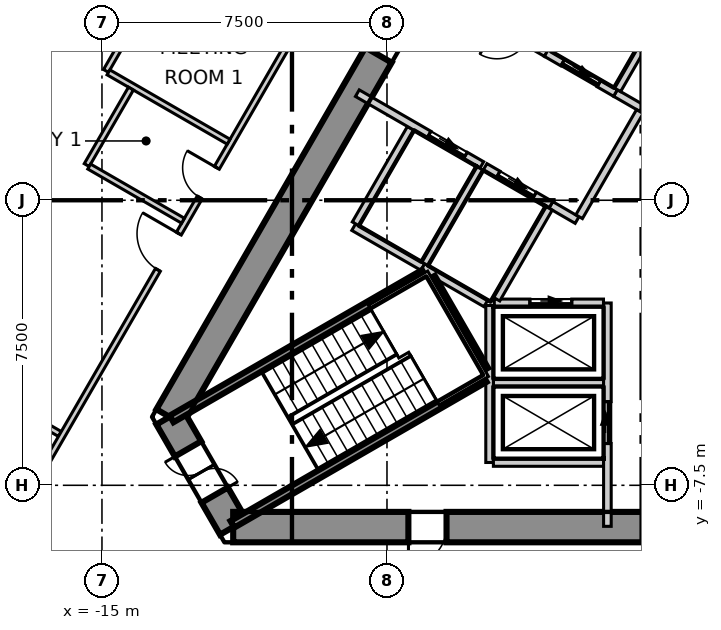
"""IFC4 building model, lengths in metres.
Left out: names, types, materials, properties, quantities, classifications, styles, units other than length and angle.
Written with IfcOpenShell. Run it as: python <this file> out.ifc"""

import sys

from ifc_helpers import new_model, si_unit, direction, frame, frame_2d, origin, place, context, subcontext, project, spatial, polyline, rectangle, outline, extrude, element, fill, save


model = new_model("IFC4")
c1 = context("Model", 3, precision=1e-05, world=origin(), true_north=direction((0.0, 1.0)))
c2 = subcontext(c1, "Body", "Model", "MODEL_VIEW")
j1 = project(units=[si_unit("LENGTHUNIT", "METRE"), si_unit("PLANEANGLEUNIT", "RADIAN")], contexts=[c1])
p1 = place(None, origin())
s1 = spatial("IfcSite", under=j1, at=p1, CompositionType="ELEMENT")
p2 = place(p1, origin())
s2 = spatial("IfcBuilding", under=s1, at=p2, CompositionType="ELEMENT")
p3 = place(p2, frame((0.0, 0.0, 140.3)))
s3 = spatial("IfcBuildingStorey", under=s2, at=p3, CompositionType="ELEMENT", Elevation=140.3)
p4 = place(p3, frame((-1.674, 14.3, -0.3), z_axis=(0.0, 0.0, 1.0), x_axis=(-0.499995765644, -0.866027848477, 0.0)))
e1 = element("IfcWall", 1, at=p4, inside=s3, PredefinedType="SHEAR", context=c2, shape_type="SweptSolid", body=[
    extrude(outline(polyline([(-0.231, -0.4), (1.732, -0.4), (3.695, -0.4), (5.658, -0.4), (7.621, -0.4), (9.584, -0.4), (11.547, -0.4), (13.51, -0.4), (15.473, -0.4), (17.436, -0.4), (19.399, -0.4), (21.362, -0.4), (23.325, -0.4), (22.863, 0.4), (20.977, 0.4), (19.091, 0.4), (17.205, 0.4), (15.319, 0.4), (13.433, 0.4), (11.547, 0.4), (9.661, 0.4), (7.775, 0.4), (5.889, 0.4), (4.003, 0.4), (2.117, 0.4), (0.231, 0.4), (-0.231, -0.4)])), origin(), (0.0, 0.0, 1.0), 4.0),
])
p5 = place(p4, frame((10.997, 0.0, 0.3)))
e2 = element("IfcOpeningElement", 2, at=p5, cuts=e1, PredefinedType="OPENING", context=c2, shape_type="SweptSolid", body=[
    extrude(rectangle(XDim=1.1, YDim=2.1, at=frame_2d((0.55, 1.05))), frame((0.0, 0.41, 0.0), z_axis=(0.0, -1.0, 0.0), x_axis=(1.0, 0.0, 0.0)), (0.0, 0.0, 1.0), 0.82),
])
p6 = place(p4, frame((4.474, 0.0, 0.3)))
e3 = element("IfcOpeningElement", 3, at=p6, cuts=e1, PredefinedType="OPENING", context=c2, shape_type="SweptSolid", body=[
    extrude(rectangle(XDim=0.9, YDim=2.1, at=frame_2d((0.45, 1.05))), frame((0.0, 0.41, 0.0), z_axis=(0.0, -1.0, 0.0), x_axis=(1.0, 0.0, 0.0)), (0.0, 0.0, 1.0), 0.82),
])
p7 = place(p3, frame((-13.221, -5.7, -0.3), z_axis=(0.0, 0.0, 1.0), x_axis=(0.49987182685, -0.866099391942, 0.0)))
e4 = element("IfcWall", 4, at=p7, inside=s3, PredefinedType="SHEAR", context=c2, shape_type="SweptSolid", body=[
    extrude(outline(polyline([(-0.231, -0.4), (1.674, -0.4), (3.579, -0.4), (3.118, 0.4), (1.674, 0.4), (0.231, 0.4), (-0.231, -0.4)])), origin(), (0.0, 0.0, 1.0), 4.0),
])
p8 = place(p7, frame((0.974, 0.0, 0.3)))
e5 = element("IfcOpeningElement", 5, at=p8, cuts=e4, PredefinedType="OPENING", context=c2, shape_type="SweptSolid", body=[
    extrude(rectangle(XDim=1.4, YDim=2.1, at=frame_2d((0.7, 1.05))), frame((0.0, 0.41, 0.0), z_axis=(0.0, -1.0, 0.0), x_axis=(1.0, 0.0, 0.0)), (0.0, 0.0, 1.0), 0.82),
])
p9 = place(p3, frame((-11.547, -8.6, -0.3), z_axis=(0.0, 0.0, 1.0), x_axis=(1.0, 0.0, 0.0)))
e6 = element("IfcWall", 6, at=p9, inside=s3, PredefinedType="SHEAR", context=c2, shape_type="SweptSolid", body=[
    extrude(outline(polyline([(-0.231, -0.4), (1.732, -0.4), (3.695, -0.4), (5.658, -0.4), (7.621, -0.4), (9.584, -0.4), (11.547, -0.4), (13.51, -0.4), (15.473, -0.4), (17.436, -0.4), (19.399, -0.4), (21.362, -0.4), (23.325, -0.4), (22.863, 0.4), (20.977, 0.4), (19.091, 0.4), (17.205, 0.4), (15.319, 0.4), (13.433, 0.4), (11.547, 0.4), (9.661, 0.4), (7.775, 0.4), (5.889, 0.4), (4.003, 0.4), (2.117, 0.4), (0.231, 0.4), (-0.231, -0.4)])), origin(), (0.0, 0.0, 1.0), 4.0),
])
p10 = place(p9, frame((4.612, 0.0, 0.3)))
e7 = element("IfcOpeningElement", 7, at=p10, cuts=e6, PredefinedType="OPENING", context=c2, shape_type="SweptSolid", body=[
    extrude(rectangle(XDim=1.0, YDim=2.1, at=frame_2d((0.5, 1.05))), frame((0.0, 0.41, 0.0), z_axis=(0.0, -1.0, 0.0), x_axis=(1.0, 0.0, 0.0)), (0.0, 0.0, 1.0), 0.82),
])
p11 = place(p9, frame((17.722, 0.0, 0.3)))
e8 = element("IfcOpeningElement", 8, at=p11, cuts=e6, PredefinedType="OPENING", context=c2, shape_type="SweptSolid", body=[
    extrude(rectangle(XDim=0.9, YDim=2.1, at=frame_2d((0.45, 1.05))), frame((0.0, 0.41, 0.0), z_axis=(0.0, -1.0, 0.0), x_axis=(1.0, 0.0, 0.0)), (0.0, 0.0, 1.0), 0.82),
])
p12 = place(p3, frame((-3.063, 34.172, 0.0), z_axis=(0.0, 0.0, 1.0), x_axis=(-0.500008098571, -0.866020728022, 0.0)))
e9 = element("IfcWall", 9, at=p12, inside=s3, PredefinedType="ELEMENTEDWALL", context=c2, shape_type="SweptSolid", body=[
    extrude(rectangle(XDim=56.105, YDim=0.2, at=frame_2d((28.052, 0.0))), origin(), (0.0, 0.0, 1.0), 3.7),
])
p13 = place(p12, frame((2.197, 0.0, 0.9)))
e10 = element("IfcOpeningElement", 10, at=p13, cuts=e9, PredefinedType="OPENING", context=c2, shape_type="SweptSolid", body=[
    extrude(rectangle(XDim=4.9, YDim=2.5, at=frame_2d((2.45, 1.25))), frame((0.0, 0.11, 0.0), z_axis=(0.0, -1.0, 0.0), x_axis=(1.0, 0.0, 0.0)), (0.0, 0.0, 1.0), 0.22),
])
p14 = place(p12, frame((8.887, 0.0, 0.9)))
e11 = element("IfcOpeningElement", 11, at=p14, cuts=e9, PredefinedType="OPENING", context=c2, shape_type="SweptSolid", body=[
    extrude(rectangle(XDim=4.9, YDim=2.5, at=frame_2d((2.45, 1.25))), frame((0.0, 0.11, 0.0), z_axis=(0.0, -1.0, 0.0), x_axis=(1.0, 0.0, 0.0)), (0.0, 0.0, 1.0), 0.22),
])
p15 = place(p12, frame((15.577, 0.0, 0.9)))
e12 = element("IfcOpeningElement", 12, at=p15, cuts=e9, PredefinedType="OPENING", context=c2, shape_type="SweptSolid", body=[
    extrude(rectangle(XDim=4.9, YDim=2.5, at=frame_2d((2.45, 1.25))), frame((0.0, 0.11, 0.0), z_axis=(0.0, -1.0, 0.0), x_axis=(1.0, 0.0, 0.0)), (0.0, 0.0, 1.0), 0.22),
])
p16 = place(p12, frame((22.267, 0.0, 0.9)))
e13 = element("IfcOpeningElement", 13, at=p16, cuts=e9, PredefinedType="OPENING", context=c2, shape_type="SweptSolid", body=[
    extrude(rectangle(XDim=4.9, YDim=2.5, at=frame_2d((2.45, 1.25))), frame((0.0, 0.11, 0.0), z_axis=(0.0, -1.0, 0.0), x_axis=(1.0, 0.0, 0.0)), (0.0, 0.0, 1.0), 0.22),
])
p17 = place(p12, frame((28.957, 0.0, 0.9)))
e14 = element("IfcOpeningElement", 14, at=p17, cuts=e9, PredefinedType="OPENING", context=c2, shape_type="SweptSolid", body=[
    extrude(rectangle(XDim=4.9, YDim=2.5, at=frame_2d((2.45, 1.25))), frame((0.0, 0.11, 0.0), z_axis=(0.0, -1.0, 0.0), x_axis=(1.0, 0.0, 0.0)), (0.0, 0.0, 1.0), 0.22),
])
p18 = place(p12, frame((35.647, 0.0, 0.9)))
e15 = element("IfcOpeningElement", 15, at=p18, cuts=e9, PredefinedType="OPENING", context=c2, shape_type="SweptSolid", body=[
    extrude(rectangle(XDim=4.9, YDim=2.5, at=frame_2d((2.45, 1.25))), frame((0.0, 0.11, 0.0), z_axis=(0.0, -1.0, 0.0), x_axis=(1.0, 0.0, 0.0)), (0.0, 0.0, 1.0), 0.22),
])
p19 = place(p12, frame((42.337, 0.0, 0.9)))
e16 = element("IfcOpeningElement", 16, at=p19, cuts=e9, PredefinedType="OPENING", context=c2, shape_type="SweptSolid", body=[
    extrude(rectangle(XDim=4.9, YDim=2.5, at=frame_2d((2.45, 1.25))), frame((0.0, 0.11, 0.0), z_axis=(0.0, -1.0, 0.0), x_axis=(1.0, 0.0, 0.0)), (0.0, 0.0, 1.0), 0.22),
])
p20 = place(p12, frame((49.027, 0.0, 0.9)))
e17 = element("IfcOpeningElement", 17, at=p20, cuts=e9, PredefinedType="OPENING", context=c2, shape_type="SweptSolid", body=[
    extrude(rectangle(XDim=4.9, YDim=2.5, at=frame_2d((2.45, 1.25))), frame((0.0, 0.11, 0.0), z_axis=(0.0, -1.0, 0.0), x_axis=(1.0, 0.0, 0.0)), (0.0, 0.0, 1.0), 0.22),
])
p21 = place(p3, frame((-23.715, -1.758, 0.0), z_axis=(0.0, 0.0, 1.0), x_axis=(0.866033311227, -0.499986303657, 0.0)))
e18 = element("IfcWall", 18, at=p21, inside=s3, PredefinedType="PARTITIONING", context=c2, shape_type="SweptSolid", body=[
    extrude(rectangle(XDim=8.784, YDim=0.15, at=frame_2d((4.392, 0.0))), origin(), (0.0, 0.0, 1.0), 3.7),
])
p22 = place(p3, frame((-18.631, -10.669, 0.0), z_axis=(0.0, 0.0, 1.0), x_axis=(0.50004165882, 0.866001350717, 0.0)))
e19 = element("IfcWall", 19, at=p22, inside=s3, PredefinedType="PARTITIONING", context=c2, shape_type="SweptSolid", body=[
    extrude(rectangle(XDim=17.655, YDim=0.15, at=frame_2d((8.827, 0.0))), origin(), (0.0, 0.0, 1.0), 3.7),
])
p23 = place(p22, frame((10.206, 0.0, 0.0)))
e20 = element("IfcOpeningElement", 20, at=p23, cuts=e19, PredefinedType="OPENING", context=c2, shape_type="SweptSolid", body=[
    extrude(rectangle(XDim=1.1, YDim=2.1, at=frame_2d((0.55, 1.05))), frame((0.0, 0.085, 0.0), z_axis=(0.0, -1.0, 0.0), x_axis=(1.0, 0.0, 0.0)), (0.0, 0.0, 1.0), 0.17),
])
p24 = place(p22, frame((12.406, 0.0, 0.0)))
e21 = element("IfcOpeningElement", 21, at=p24, cuts=e19, PredefinedType="OPENING", context=c2, shape_type="SweptSolid", body=[
    extrude(rectangle(XDim=0.9, YDim=2.1, at=frame_2d((0.45, 1.05))), frame((0.0, 0.085, 0.0), z_axis=(0.0, -1.0, 0.0), x_axis=(1.0, 0.0, 0.0)), (0.0, 0.0, 1.0), 0.17),
])
p25 = place(p22, frame((1.925, 0.0, 0.0)))
e22 = element("IfcOpeningElement", 22, at=p25, cuts=e19, PredefinedType="OPENING", context=c2, shape_type="SweptSolid", body=[
    extrude(rectangle(XDim=1.1, YDim=2.1, at=frame_2d((0.55, 1.05))), frame((0.0, 0.085, 0.0), z_axis=(0.0, -1.0, 0.0), x_axis=(1.0, 0.0, 0.0)), (0.0, 0.0, 1.0), 0.17),
])
p26 = place(p3, frame((-14.894, 3.403, 0.0), z_axis=(0.0, 0.0, 1.0), x_axis=(0.500064136673, 0.865988371292, 0.0)))
e23 = element("IfcWall", 23, at=p26, inside=s3, PredefinedType="PARTITIONING", context=c2, shape_type="SweptSolid", body=[
    extrude(rectangle(XDim=3.525, YDim=0.15, at=frame_2d((1.763, 0.0))), origin(), (0.0, 0.0, 1.0), 3.7),
])
p27 = place(p3, frame((-14.829, 3.366, 0.0), z_axis=(0.0, 0.0, 1.0), x_axis=(0.866040790738, -0.499973348067, 0.0)))
e24 = element("IfcWall", 24, at=p27, inside=s3, PredefinedType="PARTITIONING", context=c2, shape_type="SweptSolid", body=[
    extrude(rectangle(XDim=3.65, YDim=0.15, at=frame_2d((1.825, 0.0))), origin(), (0.0, 0.0, 1.0), 3.7),
])
p28 = place(p3, frame((-15.401, 0.925, 0.0), z_axis=(0.0, 0.0, 1.0), x_axis=(0.500216356891, 0.865900454035, 0.0)))
e25 = element("IfcWall", 25, at=p28, inside=s3, PredefinedType="PARTITIONING", context=c2, shape_type="SweptSolid", body=[
    extrude(rectangle(XDim=2.325, YDim=0.15, at=frame_2d((1.162, 0.0))), origin(), (0.0, 0.0, 1.0), 3.7),
])
p29 = place(p3, frame((-15.336, 0.887, 0.0), z_axis=(0.0, 0.0, 1.0), x_axis=(0.866004402611, -0.500036373335, 0.0)))
e26 = element("IfcWall", 26, at=p29, inside=s3, PredefinedType="PARTITIONING", context=c2, shape_type="SweptSolid", body=[
    extrude(rectangle(XDim=2.85, YDim=0.15, at=frame_2d((1.425, 0.0))), origin(), (0.0, 0.0, 1.0), 3.7),
])
p30 = place(p3, frame((-8.376, -0.707, 0.0), z_axis=(0.0, 0.0, 1.0), x_axis=(0.866067520717, -0.499927044236, 0.0)))
e27 = element("IfcWall", 27, at=p30, inside=s3, PredefinedType="SOLIDWALL", context=c2, shape_type="SweptSolid", body=[
    extrude(rectangle(XDim=2.1, YDim=0.2, at=frame_2d((1.05, 0.0))), origin(), (0.0, 0.0, 1.0), 3.7),
])
p31 = place(p3, frame((-8.326, -0.62, 0.0), z_axis=(0.0, 0.0, 1.0), x_axis=(0.500023687443, 0.866011727401, 0.0)))
e28 = element("IfcWall", 28, at=p31, inside=s3, PredefinedType="SOLIDWALL", context=c2, shape_type="SweptSolid", body=[
    extrude(rectangle(XDim=2.9, YDim=0.2, at=frame_2d((1.45, 0.0))), origin(), (0.0, 0.0, 1.0), 3.7),
])
p32 = place(p3, frame((-4.7, -4.8, 0.0), z_axis=(0.0, 0.0, 1.0), x_axis=(1.0, 0.0, 0.0)))
e29 = element("IfcWall", 29, at=p32, inside=s3, PredefinedType="SOLIDWALL", context=c2, shape_type="SweptSolid", body=[
    extrude(rectangle(XDim=2.9, YDim=0.2, at=frame_2d((1.45, 0.0))), origin(), (0.0, 0.0, 1.0), 3.7),
])
p33 = place(p3, frame((-4.8, -6.9, 0.0), z_axis=(0.0, 0.0, 1.0), x_axis=(0.0, 1.0, 0.0)))
e30 = element("IfcWall", 30, at=p33, inside=s3, PredefinedType="SOLIDWALL", context=c2, shape_type="SweptSolid", body=[
    extrude(rectangle(XDim=4.131, YDim=0.2, at=frame_2d((2.065, 0.0))), origin(), (0.0, 0.0, 1.0), 3.7),
])
p34 = place(p3, frame((-4.7, -6.9, 0.0), z_axis=(0.0, 0.0, 1.0), x_axis=(1.0, 0.0, 0.0)))
e31 = element("IfcWall", 31, at=p34, inside=s3, PredefinedType="SOLIDWALL", context=c2, shape_type="SweptSolid", body=[
    extrude(rectangle(XDim=2.9, YDim=0.2, at=frame_2d((1.45, 0.0))), origin(), (0.0, 0.0, 1.0), 3.7),
])
p35 = place(p3, frame((-1.7, -8.58, 0.0), z_axis=(0.0, 0.0, 1.0), x_axis=(0.0, 1.0, 0.0)))
e32 = element("IfcWall", 32, at=p35, inside=s3, PredefinedType="SOLIDWALL", context=c2, shape_type="SweptSolid", body=[
    extrude(rectangle(XDim=5.877, YDim=0.2, at=frame_2d((2.938, 0.0))), origin(), (0.0, 0.0, 1.0), 3.7),
])
p36 = place(p35, frame((2.18, 0.0, 0.0)))
e33 = element("IfcOpeningElement", 33, at=p36, cuts=e32, PredefinedType="OPENING", context=c2, shape_type="SweptSolid", body=[
    extrude(rectangle(XDim=1.1, YDim=2.1, at=frame_2d((0.55, 1.05))), frame((0.0, 0.11, 0.0), z_axis=(0.0, -1.0, 0.0), x_axis=(1.0, 0.0, 0.0)), (0.0, 0.0, 1.0), 0.22),
])
p37 = place(p3, frame((-4.676, -2.7, 0.0), z_axis=(0.0, 0.0, 1.0), x_axis=(1.0, 0.0, 0.0)))
e34 = element("IfcWall", 34, at=p37, inside=s3, PredefinedType="SOLIDWALL", context=c2, shape_type="SweptSolid", body=[
    extrude(rectangle(XDim=2.873, YDim=0.2, at=frame_2d((1.437, 0.0))), origin(), (0.0, 0.0, 1.0), 3.7),
])
p38 = place(p37, frame((0.937, 0.0, 0.0)))
e35 = element("IfcOpeningElement", 35, at=p38, cuts=e34, PredefinedType="OPENING", context=c2, shape_type="SweptSolid", body=[
    extrude(rectangle(XDim=1.1, YDim=2.1, at=frame_2d((0.55, 1.05))), frame((0.0, 0.11, 0.0), z_axis=(0.0, -1.0, 0.0), x_axis=(1.0, 0.0, 0.0)), (0.0, 0.0, 1.0), 0.22),
])
p39 = place(p3, frame((-8.28, 2.818, 0.0), z_axis=(0.0, 0.0, 1.0), x_axis=(0.86600175068, -0.50004096614, 0.0)))
e36 = element("IfcWall", 36, at=p39, inside=s3, PredefinedType="SOLIDWALL", context=c2, shape_type="SweptSolid", body=[
    extrude(rectangle(XDim=3.782, YDim=0.2, at=frame_2d((1.891, 0.0))), origin(), (0.0, 0.0, 1.0), 3.7),
])
p40 = place(p39, frame((2.18, 0.0, 0.0)))
e37 = element("IfcOpeningElement", 37, at=p40, cuts=e36, PredefinedType="OPENING", context=c2, shape_type="SweptSolid", body=[
    extrude(rectangle(XDim=1.1, YDim=2.1, at=frame_2d((0.55, 1.05))), frame((0.0, 0.11, 0.0), z_axis=(0.0, -1.0, 0.0), x_axis=(1.0, 0.0, 0.0)), (0.0, 0.0, 1.0), 0.22),
])
p41 = place(p3, frame((-3.188, -0.122, 0.0), z_axis=(0.0, 0.0, 1.0), x_axis=(0.865705793592, -0.50055317294, 0.0)))
e38 = element("IfcWall", 38, at=p41, inside=s3, PredefinedType="SOLIDWALL", context=c2, shape_type="SweptSolid", body=[
    extrude(rectangle(XDim=0.797, YDim=0.2, at=frame_2d((0.398, 0.0))), origin(), (0.0, 0.0, 1.0), 3.7),
])
p42 = place(p3, frame((-6.58, 5.762, 0.0), z_axis=(0.0, 0.0, 1.0), x_axis=(0.866029704776, -0.49999255039, 0.0)))
e39 = element("IfcWall", 39, at=p42, inside=s3, PredefinedType="SOLIDWALL", context=c2, shape_type="SweptSolid", body=[
    extrude(rectangle(XDim=3.782, YDim=0.2, at=frame_2d((1.891, 0.0))), origin(), (0.0, 0.0, 1.0), 3.7),
])
p43 = place(p42, frame((2.279, 0.0, 0.0)))
e40 = element("IfcOpeningElement", 40, at=p43, cuts=e39, PredefinedType="OPENING", context=c2, shape_type="SweptSolid", body=[
    extrude(rectangle(XDim=0.9, YDim=2.1, at=frame_2d((0.45, 1.05))), frame((0.0, 0.11, 0.0), z_axis=(0.0, -1.0, 0.0), x_axis=(1.0, 0.0, 0.0)), (0.0, 0.0, 1.0), 0.22),
])
p44 = place(p3, frame((-1.488, 2.822, 0.0), z_axis=(0.0, 0.0, 1.0), x_axis=(0.866236612152, -0.499633997809, 0.0)))
e41 = element("IfcWall", 41, at=p44, inside=s3, PredefinedType="SOLIDWALL", context=c2, shape_type="SweptSolid", body=[
    extrude(rectangle(XDim=0.796, YDim=0.2, at=frame_2d((0.398, 0.0))), origin(), (0.0, 0.0, 1.0), 3.7),
])
p45 = place(p3, frame((-2.444, -0.433, 0.0), z_axis=(0.0, 0.0, 1.0), x_axis=(0.500035624827, 0.866004834804, 0.0)))
e42 = element("IfcWall", 42, at=p45, inside=s3, PredefinedType="SOLIDWALL", context=c2, shape_type="SweptSolid", body=[
    extrude(rectangle(XDim=3.194, YDim=0.2, at=frame_2d((1.597, 0.0))), origin(), (0.0, 0.0, 1.0), 3.7),
])
p46 = place(p3, frame((-6.557, -1.757, 0.0), z_axis=(0.0, 0.0, 1.0), x_axis=(0.8659754619, -0.500086491905, 0.0)))
e43 = element("IfcWall", 43, at=p46, inside=s3, PredefinedType="SOLIDWALL", context=c2, shape_type="SweptSolid", body=[
    extrude(rectangle(XDim=1.916, YDim=0.2, at=frame_2d((0.958, 0.0))), origin(), (0.0, 0.0, 1.0), 3.7),
])
p47 = place(p3, frame((-6.507, -1.67, 0.0), z_axis=(0.0, 0.0, 1.0), x_axis=(0.50012328804, 0.865954211699, 0.0)))
e44 = element("IfcWall", 44, at=p47, inside=s3, PredefinedType="SOLIDWALL", context=c2, shape_type="SweptSolid", body=[
    extrude(rectangle(XDim=2.9, YDim=0.2, at=frame_2d((1.45, 0.0))), origin(), (0.0, 0.0, 1.0), 3.7),
])
p48 = place(p3, frame((-4.92, 0.878, 0.0), z_axis=(0.0, 0.0, 1.0), x_axis=(0.866010750942, -0.50002537861, 0.0)))
e45 = element("IfcWall", 45, at=p48, inside=s3, PredefinedType="SOLIDWALL", context=c2, shape_type="SweptSolid", body=[
    extrude(rectangle(XDim=2.0, YDim=0.2, at=frame_2d((1.0, 0.0))), origin(), (0.0, 0.0, 1.0), 3.7),
])
p49 = place(p48, frame((0.4, 0.0, 0.0)))
e46 = element("IfcOpeningElement", 46, at=p49, cuts=e45, PredefinedType="OPENING", context=c2, shape_type="SweptSolid", body=[
    extrude(rectangle(XDim=1.1, YDim=2.1, at=frame_2d((0.55, 1.05))), frame((0.0, 0.11, 0.0), z_axis=(0.0, -1.0, 0.0), x_axis=(1.0, 0.0, 0.0)), (0.0, 0.0, 1.0), 0.22),
])
p50 = place(p3, frame((-4.619, -2.6, 0.0), z_axis=(0.0, 0.0, 1.0), x_axis=(0.50009492287, 0.865970593103, 0.0)))
e47 = element("IfcWall", 47, at=p50, inside=s3, PredefinedType="SOLIDWALL", context=c2, shape_type="SweptSolid", body=[
    extrude(rectangle(XDim=2.761, YDim=0.2, at=frame_2d((1.381, 0.0))), origin(), (0.0, 0.0, 1.0), 3.7),
])
p51 = place(p3, frame((-3.309, 3.873, 0.0), z_axis=(0.0, 0.0, 1.0), x_axis=(0.866098583652, -0.499873227325, 0.0)))
e48 = element("IfcWall", 48, at=p51, inside=s3, PredefinedType="SOLIDWALL", context=c2, shape_type="SweptSolid", body=[
    extrude(rectangle(XDim=2.103, YDim=0.2, at=frame_2d((1.051, 0.0))), origin(), (0.0, 0.0, 1.0), 3.7),
])
p52 = place(p51, frame((0.502, 0.0, 0.0)))
e49 = element("IfcOpeningElement", 49, at=p52, cuts=e48, PredefinedType="OPENING", context=c2, shape_type="SweptSolid", body=[
    extrude(rectangle(XDim=1.1, YDim=2.1, at=frame_2d((0.55, 1.05))), frame((0.0, 0.11, 0.0), z_axis=(0.0, -1.0, 0.0), x_axis=(1.0, 0.0, 0.0)), (0.0, 0.0, 1.0), 0.22),
])
p53 = place(p3, frame((-1.438, 2.909, 0.0), z_axis=(0.0, 0.0, 1.0), x_axis=(0.499829630636, 0.866123744241, 0.0)))
e50 = element("IfcWall", 50, at=p53, inside=s3, PredefinedType="SOLIDWALL", context=c2, shape_type="SweptSolid", body=[
    extrude(rectangle(XDim=2.761, YDim=0.2, at=frame_2d((1.38, 0.0))), origin(), (0.0, 0.0, 1.0), 3.7),
])
p54 = place(p3, frame((-13.167, -5.754, 0.0), z_axis=(0.0, 0.0, 1.0), x_axis=(0.866060938598, 0.499938446846, 0.0)))
e51 = element("IfcWall", 51, at=p54, inside=s3, PredefinedType="SOLIDWALL", context=c2, shape_type="SweptSolid", body=[
    extrude(rectangle(XDim=7.665, YDim=0.2, at=frame_2d((3.832, 0.0))), origin(), (0.0, 0.0, 1.0), 3.7),
])
p55 = place(p3, frame((-6.329, -2.038, 0.0), z_axis=(0.0, 0.0, 1.0), x_axis=(0.500200581029, -0.865909567298, 0.0)))
e52 = element("IfcWall", 52, at=p55, inside=s3, PredefinedType="SOLIDWALL", context=c2, shape_type="SweptSolid", body=[
    extrude(rectangle(XDim=2.799, YDim=0.2, at=frame_2d((1.399, 0.0))), origin(), (0.0, 0.0, 1.0), 3.7),
])
p56 = place(p3, frame((-11.567, -8.526, 0.0), z_axis=(0.0, 0.0, 1.0), x_axis=(0.866005769735, 0.50003400563, 0.0)))
e53 = element("IfcWall", 53, at=p56, inside=s3, PredefinedType="SOLIDWALL", context=c2, shape_type="SweptSolid", body=[
    extrude(rectangle(XDim=7.665, YDim=0.2, at=frame_2d((3.833, 0.0))), origin(), (0.0, 0.0, 1.0), 3.7),
])
p57 = place(p38, origin())
e54 = element("IfcDoor", 54, at=p57, inside=s3, OperationType="SLIDING_TO_LEFT", PredefinedType="DOOR", context=c2, shape_type="SweptSolid", body=[
    extrude(rectangle(XDim=1.1, YDim=2.1, at=frame_2d((0.55, 1.05))), frame((0.0, 0.025, 0.0), z_axis=(0.0, -1.0, 0.0), x_axis=(1.0, 0.0, 0.0)), (0.0, 0.0, 1.0), 0.05),
])
fill(e35, e54)
p58 = place(p36, origin())
e55 = element("IfcDoor", 55, at=p58, inside=s3, OperationType="SLIDING_TO_LEFT", PredefinedType="DOOR", context=c2, shape_type="SweptSolid", body=[
    extrude(rectangle(XDim=1.1, YDim=2.1, at=frame_2d((0.55, 1.05))), frame((0.0, 0.025, 0.0), z_axis=(0.0, -1.0, 0.0), x_axis=(1.0, 0.0, 0.0)), (0.0, 0.0, 1.0), 0.05),
])
fill(e33, e55)
p59 = place(p49, origin())
e56 = element("IfcDoor", 56, at=p59, inside=s3, OperationType="SLIDING_TO_LEFT", PredefinedType="DOOR", context=c2, shape_type="SweptSolid", body=[
    extrude(rectangle(XDim=1.1, YDim=2.1, at=frame_2d((0.55, 1.05))), frame((0.0, 0.025, 0.0), z_axis=(0.0, -1.0, 0.0), x_axis=(1.0, 0.0, 0.0)), (0.0, 0.0, 1.0), 0.05),
])
fill(e46, e56)
p60 = place(p52, origin())
e57 = element("IfcDoor", 57, at=p60, inside=s3, OperationType="SLIDING_TO_LEFT", PredefinedType="DOOR", context=c2, shape_type="SweptSolid", body=[
    extrude(rectangle(XDim=1.1, YDim=2.1, at=frame_2d((0.55, 1.05))), frame((0.0, 0.025, 0.0), z_axis=(0.0, -1.0, 0.0), x_axis=(1.0, 0.0, 0.0)), (0.0, 0.0, 1.0), 0.05),
])
fill(e49, e57)
p61 = place(p40, origin())
e58 = element("IfcDoor", 58, at=p61, inside=s3, OperationType="SLIDING_TO_LEFT", PredefinedType="DOOR", context=c2, shape_type="SweptSolid", body=[
    extrude(rectangle(XDim=1.1, YDim=2.1, at=frame_2d((0.55, 1.05))), frame((0.0, 0.025, 0.0), z_axis=(0.0, -1.0, 0.0), x_axis=(1.0, 0.0, 0.0)), (0.0, 0.0, 1.0), 0.05),
])
fill(e37, e58)
p62 = place(p23, origin())
e59 = element("IfcDoor", 59, at=p62, inside=s3, OperationType="SINGLE_SWING_LEFT", PredefinedType="DOOR", context=c2, shape_type="SweptSolid", body=[
    extrude(rectangle(XDim=1.1, YDim=2.1, at=frame_2d((0.55, 1.05))), frame((0.0, 0.025, 0.0), z_axis=(0.0, -1.0, 0.0), x_axis=(1.0, 0.0, 0.0)), (0.0, 0.0, 1.0), 0.05),
])
fill(e20, e59)
p63 = place(p24, origin())
e60 = element("IfcDoor", 60, at=p63, inside=s3, OperationType="SINGLE_SWING_LEFT", PredefinedType="DOOR", context=c2, shape_type="SweptSolid", body=[
    extrude(rectangle(XDim=0.9, YDim=2.1, at=frame_2d((0.45, 1.05))), frame((0.0, 0.025, 0.0), z_axis=(0.0, -1.0, 0.0), x_axis=(1.0, 0.0, 0.0)), (0.0, 0.0, 1.0), 0.05),
])
fill(e21, e60)
p64 = place(p8, origin())
e61 = element("IfcDoor", 61, at=p64, inside=s3, OperationType="DOUBLE_DOOR_SINGLE_SWING", PredefinedType="DOOR", context=c2, shape_type="SweptSolid", body=[
    extrude(rectangle(XDim=1.4, YDim=2.1, at=frame_2d((0.7, 1.05))), frame((0.0, 0.025, 0.0), z_axis=(0.0, -1.0, 0.0), x_axis=(1.0, 0.0, 0.0)), (0.0, 0.0, 1.0), 0.05),
])
fill(e5, e61)
p65 = place(p5, origin())
e62 = element("IfcDoor", 62, at=p65, inside=s3, OperationType="SINGLE_SWING_LEFT", PredefinedType="DOOR", context=c2, shape_type="SweptSolid", body=[
    extrude(rectangle(XDim=1.1, YDim=2.1, at=frame_2d((0.55, 1.05))), frame((0.0, 0.025, 0.0), z_axis=(0.0, -1.0, 0.0), x_axis=(1.0, 0.0, 0.0)), (0.0, 0.0, 1.0), 0.05),
])
fill(e2, e62)
p66 = place(p10, origin())
e63 = element("IfcDoor", 63, at=p66, inside=s3, OperationType="SINGLE_SWING_LEFT", PredefinedType="DOOR", context=c2, shape_type="SweptSolid", body=[
    extrude(rectangle(XDim=1.0, YDim=2.1, at=frame_2d((0.5, 1.05))), frame((0.0, 0.125, 0.0), z_axis=(0.0, -1.0, 0.0), x_axis=(1.0, 0.0, 0.0)), (0.0, 0.0, 1.0), 0.05),
])
fill(e7, e63)
save(model, sys.argv[1])
